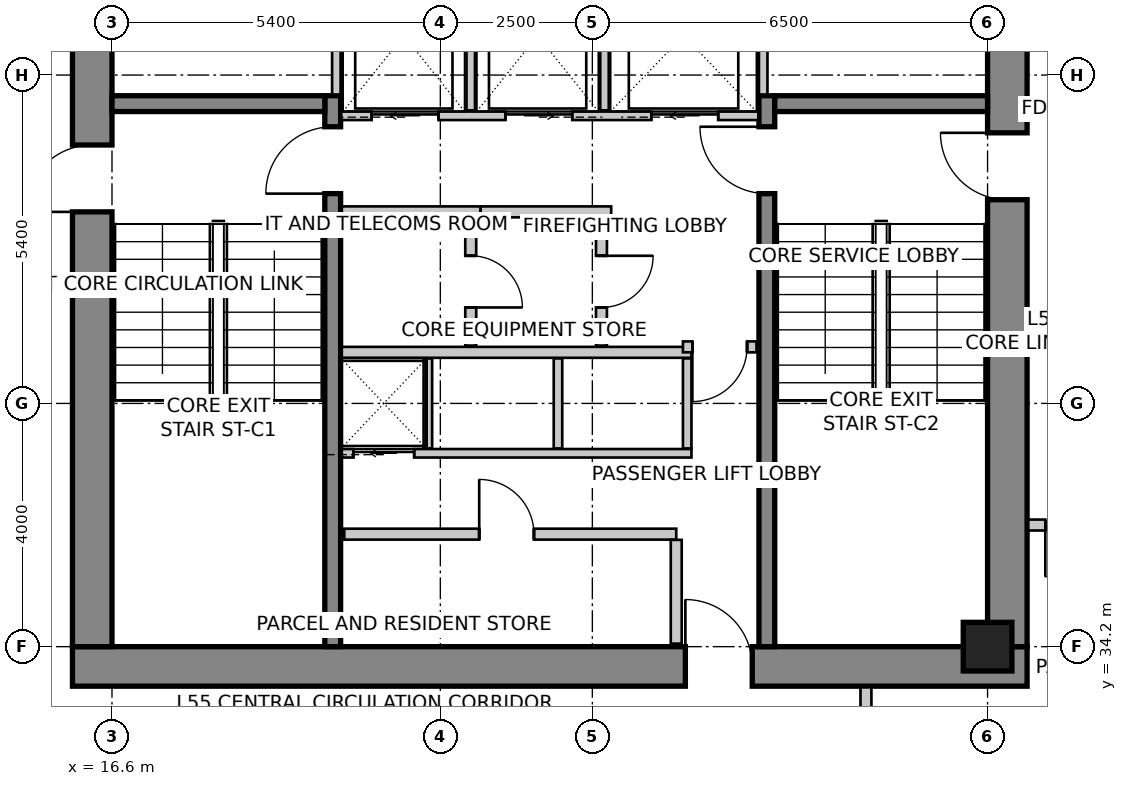
"""IFC4 building model, lengths in metres.
Left out: names, types, materials, properties, quantities, classifications, styles, units other than length and angle.
Written with IfcOpenShell. Run it as: python <this file> out.ifc"""

import sys

from ifc_helpers import new_model, si_unit, direction, frame, frame_2d, origin, origin_2d, place, context, subcontext, project, spatial, rectangle, extrude, source, transform, mapped, element, fill, save


model = new_model("IFC4")
c1 = context("Model", 3, precision=1e-05, world=origin(), true_north=direction((0.0, 1.0)))
c2 = subcontext(c1, "Body", "Model", "MODEL_VIEW")
j1 = project(units=[si_unit("LENGTHUNIT", "METRE"), si_unit("PLANEANGLEUNIT", "RADIAN")], contexts=[c1])
p1 = place(None, origin())
s1 = spatial("IfcSite", under=j1, at=p1, CompositionType="ELEMENT")
p2 = place(p1, origin())
s2 = spatial("IfcBuilding", under=s1, at=p2, CompositionType="ELEMENT")
p3 = place(p2, frame((0.0, 0.0, 218.4)))
s3 = spatial("IfcBuildingStorey", under=s2, at=p3, CompositionType="ELEMENT", Elevation=218.4)
p4 = place(p3, frame((15.95, 33.875, 0.0), z_axis=(0.0, 0.0, 1.0), x_axis=(1.0, 0.0, 0.0)))
e1 = element("IfcWall", 1, at=p4, inside=s3, PredefinedType="SHEAR", context=c2, shape_type="SweptSolid", body=[
    extrude(rectangle(XDim=15.7, YDim=0.65, at=frame_2d((7.85, 0.0))), origin(), (0.0, 0.0, 1.0), 3.5),
])
m1 = source(origin(), c2, "Body", "SweptSolid", [
    extrude(rectangle(XDim=1.1, YDim=2.15, at=frame_2d((0.55, 1.075))), frame((0.0, 0.335, 0.0), z_axis=(0.0, -1.0, 0.0), x_axis=(1.0, 0.0, 0.0)), (0.0, 0.0, 1.0), 0.67),
])
p5 = place(p4, frame((10.08, 0.0, 0.0)))
e2 = element("IfcOpeningElement", 2, at=p5, cuts=e1, PredefinedType="OPENING", context=c2, shape_type="MappedRepresentation", body=[
    mapped(m1, transform((0.0, 0.0, 0.0), scale=1.0)),
])
p6 = place(p3, frame((16.275, 34.2, 0.0), z_axis=(0.0, 0.0, 1.0), x_axis=(0.0, 1.0, 0.0)))
e3 = element("IfcWall", 3, at=p6, inside=s3, PredefinedType="SHEAR", context=c2, shape_type="SweptSolid", body=[
    extrude(rectangle(XDim=11.4, YDim=0.65, at=frame_2d((5.7, 0.0))), origin(), (0.0, 0.0, 1.0), 3.5),
])
p7 = place(p6, frame((7.15, 0.0, 0.0)))
e4 = element("IfcOpeningElement", 4, at=p7, cuts=e3, PredefinedType="OPENING", context=c2, shape_type="MappedRepresentation", body=[
    mapped(m1, transform((0.0, 0.0, 0.0), scale=1.0)),
])
p8 = place(p3, frame((31.325, 34.2, 0.0), z_axis=(0.0, 0.0, 1.0), x_axis=(0.0, 1.0, 0.0)))
e5 = element("IfcWall", 5, at=p8, inside=s3, PredefinedType="SHEAR", context=c2, shape_type="SweptSolid", body=[
    extrude(rectangle(XDim=11.4, YDim=0.65, at=frame_2d((5.7, 0.0))), origin(), (0.0, 0.0, 1.0), 3.5),
])
p9 = place(p8, frame((7.35, 0.0, 0.0)))
e6 = element("IfcOpeningElement", 6, at=p9, cuts=e5, PredefinedType="OPENING", context=c2, shape_type="MappedRepresentation", body=[
    mapped(m1, transform((0.0, 0.0, 0.0), scale=1.0)),
])
p10 = place(p3, frame((20.23, 34.2, 0.0), z_axis=(0.0, 0.0, 1.0), x_axis=(0.0, 1.0, 0.0)))
e7 = element("IfcWall", 7, at=p10, inside=s3, PredefinedType="SHEAR", context=c2, shape_type="SweptSolid", body=[
    extrude(rectangle(XDim=9.06, YDim=0.26, at=frame_2d((4.53, 0.0))), origin(), (0.0, 0.0, 1.0), 3.5),
])
m2 = source(origin(), c2, "Body", "SweptSolid", [
    extrude(rectangle(XDim=1.1, YDim=2.15, at=frame_2d((0.55, 1.075))), frame((0.0, 0.14, 0.0), z_axis=(0.0, -1.0, 0.0), x_axis=(1.0, 0.0, 0.0)), (0.0, 0.0, 1.0), 0.28),
])
p11 = place(p10, frame((7.45, 0.0, 0.0)))
e8 = element("IfcOpeningElement", 8, at=p11, cuts=e7, PredefinedType="OPENING", context=c2, shape_type="MappedRepresentation", body=[
    mapped(m2, transform((0.0, 0.0, 0.0), scale=1.0)),
])
p12 = place(p3, frame((27.37, 34.2, 0.0), z_axis=(0.0, 0.0, 1.0), x_axis=(0.0, 1.0, 0.0)))
e9 = element("IfcWall", 9, at=p12, inside=s3, PredefinedType="SHEAR", context=c2, shape_type="SweptSolid", body=[
    extrude(rectangle(XDim=9.06, YDim=0.26, at=frame_2d((4.53, 0.0))), origin(), (0.0, 0.0, 1.0), 3.5),
])
p13 = place(p12, frame((7.45, 0.0, 0.0)))
e10 = element("IfcOpeningElement", 10, at=p13, cuts=e9, PredefinedType="OPENING", context=c2, shape_type="MappedRepresentation", body=[
    mapped(m2, transform((0.0, 0.0, 0.0), scale=1.0)),
])
for number, where, z_axis, x_axis in (
    (11, (16.6, 43.13, 0.0), (0.0, 0.0, 1.0), (1.0, 0.0, 0.0)),
    (12, (27.5, 43.13, 0.0), (0.0, 0.0, 1.0), (1.0, 0.0, 0.0)),
):
    element("IfcWall", number, at=place(p3, frame(where, z_axis=z_axis, x_axis=x_axis)), inside=s3, PredefinedType="SHEAR", context=c2, shape_type="SweptSolid", body=[
        extrude(rectangle(XDim=3.5, YDim=0.26, at=frame_2d((1.75, 0.0))), origin(), (0.0, 0.0, 1.0), 3.5),
    ])
m3 = source(origin(), c2, "Body", "SweptSolid", [
    extrude(rectangle(XDim=0.8, YDim=0.8, at=origin_2d()), origin(), (0.0, 0.0, 1.0), 3.5),
])
p14 = place(p3, frame((31.0, 34.2, 0.0), z_axis=(0.0, 0.0, 1.0), x_axis=(1.0, 0.0, 0.0)))
e13 = element("IfcColumn", 13, at=p14, inside=s3, PredefinedType="COLUMN", context=c2, shape_type="MappedRepresentation", body=[
    mapped(m3, transform((0.0, 0.0, 0.0), scale=1.0)),
])
p15 = place(p3, frame((20.37, 42.93, 0.0), z_axis=(0.0, 0.0, 1.0), x_axis=(1.0, 0.0, 0.0)))
e14 = element("IfcWall", 14, at=p15, inside=s3, PredefinedType="SOLIDWALL", context=c2, shape_type="SweptSolid", body=[
    extrude(rectangle(XDim=6.86, YDim=0.14, at=frame_2d((3.43, 0.0))), origin(), (0.0, 0.0, 1.0), 3.25),
])
m4 = source(origin(), c2, "Body", "SweptSolid", [
    extrude(rectangle(XDim=1.1, YDim=2.15, at=frame_2d((0.55, 1.075))), frame((0.0, 0.08, 0.0), z_axis=(0.0, -1.0, 0.0), x_axis=(1.0, 0.0, 0.0)), (0.0, 0.0, 1.0), 0.16),
])
p16 = place(p15, frame((0.5, 0.0, 0.0)))
e15 = element("IfcOpeningElement", 15, at=p16, cuts=e14, PredefinedType="OPENING", context=c2, shape_type="MappedRepresentation", body=[
    mapped(m4, transform((0.0, 0.0, 0.0), scale=1.0)),
])
p17 = place(p15, frame((2.7, 0.0, 0.0)))
e16 = element("IfcOpeningElement", 16, at=p17, cuts=e14, PredefinedType="OPENING", context=c2, shape_type="MappedRepresentation", body=[
    mapped(m4, transform((0.0, 0.0, 0.0), scale=1.0)),
])
p18 = place(p15, frame((5.1, 0.0, 0.0)))
e17 = element("IfcOpeningElement", 17, at=p18, cuts=e14, PredefinedType="OPENING", context=c2, shape_type="MappedRepresentation", body=[
    mapped(m4, transform((0.0, 0.0, 0.0), scale=1.0)),
])
for number, where, z_axis, x_axis in (
    (18, (20.29, 43.28, 0.0), (0.0, 0.0, 1.0), (0.0, 1.0, 0.0)),
    (19, (27.31, 43.28, 0.0), (0.0, 0.0, 1.0), (0.0, 1.0, 0.0)),
):
    element("IfcWall", number, at=place(p3, frame(where, z_axis=z_axis, x_axis=x_axis)), inside=s3, PredefinedType="SOLIDWALL", context=c2, shape_type="SweptSolid", body=[
        extrude(rectangle(XDim=2.3, YDim=0.14, at=frame_2d((1.15, 0.0))), origin(), (0.0, 0.0, 1.0), 3.25),
    ])
for number, where, z_axis, x_axis in (
    (20, (22.5, 43.02, 0.0), (0.0, 0.0, 1.0), (0.0, 1.0, 0.0)),
    (21, (24.7, 43.02, 0.0), (0.0, 0.0, 1.0), (0.0, 1.0, 0.0)),
):
    element("IfcWall", number, at=place(p3, frame(where, z_axis=z_axis, x_axis=x_axis)), inside=s3, PredefinedType="SOLIDWALL", context=c2, shape_type="SweptSolid", body=[
        extrude(rectangle(XDim=2.56, YDim=0.14, at=frame_2d((1.28, 0.0))), origin(), (0.0, 0.0, 1.0), 3.25),
    ])
p19 = place(p3, frame((20.38, 37.38, 0.0), z_axis=(0.0, 0.0, 1.0), x_axis=(1.0, 0.0, 0.0)))
e22 = element("IfcWall", 22, at=p19, inside=s3, PredefinedType="SOLIDWALL", context=c2, shape_type="SweptSolid", body=[
    extrude(rectangle(XDim=5.75, YDim=0.14, at=frame_2d((2.875, 0.0))), origin(), (0.0, 0.0, 1.0), 3.25),
])
m5 = source(origin(), c2, "Body", "SweptSolid", [
    extrude(rectangle(XDim=1.0, YDim=2.15, at=frame_2d((0.5, 1.075))), frame((0.0, 0.08, 0.0), z_axis=(0.0, -1.0, 0.0), x_axis=(1.0, 0.0, 0.0)), (0.0, 0.0, 1.0), 0.16),
])
p20 = place(p19, frame((0.19, 0.0, 0.0)))
e23 = element("IfcOpeningElement", 23, at=p20, cuts=e22, PredefinedType="OPENING", context=c2, shape_type="MappedRepresentation", body=[
    mapped(m5, transform((0.0, 0.0, 0.0), scale=1.0)),
])
p21 = place(p3, frame((20.38, 39.04, 0.0), z_axis=(0.0, 0.0, 1.0), x_axis=(1.0, 0.0, 0.0)))
e24 = element("IfcWall", 24, at=p21, inside=s3, PredefinedType="SOLIDWALL", context=c2, shape_type="SweptSolid", body=[
    extrude(rectangle(XDim=5.75, YDim=0.18, at=frame_2d((2.875, 0.0))), origin(), (0.0, 0.0, 1.0), 3.25),
])
for number, where, z_axis, x_axis in (
    (25, (26.06, 37.46, 0.0), (0.0, 0.0, 1.0), (0.0, 1.0, 0.0)),
    (26, (21.795, 37.46, 0.0), (0.0, 0.0, 1.0), (0.0, 1.0, 0.0)),
    (27, (23.935, 37.46, 0.0), (0.0, 0.0, 1.0), (0.0, 1.0, 0.0)),
):
    element("IfcWall", number, at=place(p3, frame(where, z_axis=z_axis, x_axis=x_axis)), inside=s3, PredefinedType="SOLIDWALL", context=c2, shape_type="SweptSolid", body=[
        extrude(rectangle(XDim=1.48, YDim=0.14, at=frame_2d((0.74, 0.0))), origin(), (0.0, 0.0, 1.0), 3.25),
    ])
p22 = place(p3, frame((22.66, 41.35, 0.0), z_axis=(0.0, 0.0, 1.0), x_axis=(-1.0, 0.0, 0.0)))
e28 = element("IfcWall", 28, at=p22, inside=s3, PredefinedType="PARTITIONING", context=c2, shape_type="SweptSolid", body=[
    extrude(rectangle(XDim=2.28, YDim=0.18, at=frame_2d((1.14, 0.0))), origin(), (0.0, 0.0, 1.0), 3.25),
])
p23 = place(p3, frame((24.81, 41.35, 0.0), z_axis=(0.0, 0.0, 1.0), x_axis=(-1.0, 0.0, 0.0)))
e29 = element("IfcWall", 29, at=p23, inside=s3, PredefinedType="PARTITIONING", context=c2, shape_type="SweptSolid", body=[
    extrude(rectangle(XDim=2.148, YDim=0.18, at=frame_2d((1.074, 0.0))), origin(), (0.0, 0.0, 1.0), 3.25),
])
p24 = place(p3, frame((22.5, 41.256, 0.0), z_axis=(0.0, 0.0, 1.0), x_axis=(0.0, -1.0, 0.0)))
e30 = element("IfcWall", 30, at=p24, inside=s3, PredefinedType="PARTITIONING", context=c2, shape_type="SweptSolid", body=[
    extrude(rectangle(XDim=2.106, YDim=0.18, at=frame_2d((1.053, 0.0))), origin(), (0.0, 0.0, 1.0), 3.25),
])
m6 = source(origin(), c2, "Body", "SweptSolid", [
    extrude(rectangle(XDim=0.85, YDim=2.15, at=frame_2d((0.425, 1.075))), frame((0.0, 0.1, 0.0), z_axis=(0.0, -1.0, 0.0), x_axis=(1.0, 0.0, 0.0)), (0.0, 0.0, 1.0), 0.2),
])
p25 = place(p24, frame((0.628, 0.0, 0.0)))
e31 = element("IfcOpeningElement", 31, at=p25, cuts=e30, PredefinedType="OPENING", context=c2, shape_type="MappedRepresentation", body=[
    mapped(m6, transform((0.0, 0.0, 0.0), scale=1.0)),
])
p26 = place(p3, frame((24.65, 41.256, 0.0), z_axis=(0.0, 0.0, 1.0), x_axis=(0.0, -1.0, 0.0)))
e32 = element("IfcWall", 32, at=p26, inside=s3, PredefinedType="PARTITIONING", context=c2, shape_type="SweptSolid", body=[
    extrude(rectangle(XDim=2.106, YDim=0.18, at=frame_2d((1.053, 0.0))), origin(), (0.0, 0.0, 1.0), 3.25),
])
p27 = place(p26, frame((0.628, 0.0, 0.0)))
e33 = element("IfcOpeningElement", 33, at=p27, cuts=e32, PredefinedType="OPENING", context=c2, shape_type="MappedRepresentation", body=[
    mapped(m6, transform((0.0, 0.0, 0.0), scale=1.0)),
])
p28 = place(p3, frame((27.2, 39.13, 0.0), z_axis=(0.0, 0.0, 1.0), x_axis=(-1.0, 0.0, 0.0)))
e34 = element("IfcWall", 34, at=p28, inside=s3, PredefinedType="PARTITIONING", context=c2, shape_type="SweptSolid", body=[
    extrude(rectangle(XDim=1.21, YDim=0.18, at=frame_2d((0.605, 0.0))), origin(), (0.0, 0.0, 1.0), 3.25),
])
m7 = source(origin(), c2, "Body", "SweptSolid", [
    extrude(rectangle(XDim=0.9, YDim=2.15, at=frame_2d((0.45, 1.075))), frame((0.0, 0.1, 0.0), z_axis=(0.0, -1.0, 0.0), x_axis=(1.0, 0.0, 0.0)), (0.0, 0.0, 1.0), 0.2),
])
p29 = place(p28, frame((0.155, 0.0, 0.0)))
e35 = element("IfcOpeningElement", 35, at=p29, cuts=e34, PredefinedType="OPENING", context=c2, shape_type="MappedRepresentation", body=[
    mapped(m7, transform((0.0, 0.0, 0.0), scale=1.0)),
])
p30 = place(p3, frame((20.42, 36.05, 0.0), z_axis=(0.0, 0.0, 1.0), x_axis=(1.0, 0.0, 0.0)))
e36 = element("IfcWall", 36, at=p30, inside=s3, PredefinedType="PARTITIONING", context=c2, shape_type="SweptSolid", body=[
    extrude(rectangle(XDim=5.46, YDim=0.18, at=frame_2d((2.73, 0.0))), origin(), (0.0, 0.0, 1.0), 3.25),
])
p31 = place(p30, frame((2.219, 0.0, 0.0)))
e37 = element("IfcOpeningElement", 37, at=p31, cuts=e36, PredefinedType="OPENING", context=c2, shape_type="MappedRepresentation", body=[
    mapped(m7, transform((0.0, 0.0, 0.0), scale=1.0)),
])
p32 = place(p3, frame((25.88, 35.956, 0.0), z_axis=(0.0, 0.0, 1.0), x_axis=(0.0, -1.0, 0.0)))
e38 = element("IfcWall", 38, at=p32, inside=s3, PredefinedType="PARTITIONING", context=c2, shape_type="SweptSolid", body=[
    extrude(rectangle(XDim=1.706, YDim=0.18, at=frame_2d((0.853, 0.0))), origin(), (0.0, 0.0, 1.0), 2.542),
])
p33 = place(p3, frame((29.0, 33.53, 0.0), z_axis=(0.0, 0.0, 1.0), x_axis=(0.0, -1.0, 0.0)))
e39 = element("IfcWall", 39, at=p33, inside=s3, PredefinedType="PARTITIONING", context=c2, shape_type="SweptSolid", body=[
    extrude(rectangle(XDim=1.127, YDim=0.18, at=frame_2d((0.563, 0.0))), origin(), (0.0, 0.0, 1.0), 3.25),
])
p34 = place(p3, frame((33.15, 36.2, 0.0), z_axis=(0.0, 0.0, 1.0), x_axis=(-1.0, 0.0, 0.0)))
e40 = element("IfcWall", 40, at=p34, inside=s3, PredefinedType="PARTITIONING", context=c2, shape_type="SweptSolid", body=[
    extrude(rectangle(XDim=1.48, YDim=0.18, at=frame_2d((0.74, 0.0))), origin(), (0.0, 0.0, 1.0), 3.25),
])
p35 = place(p34, frame((0.35, 0.0, 0.0)))
e41 = element("IfcOpeningElement", 41, at=p35, cuts=e40, PredefinedType="OPENING", context=c2, shape_type="MappedRepresentation", body=[
    mapped(m6, transform((0.0, 0.0, 0.0), scale=1.0)),
])
m8 = source(origin(), c2, "Body", "SweptSolid", [
    extrude(rectangle(XDim=1.1, YDim=2.15, at=frame_2d((0.55, 1.075))), frame((0.0, 0.025, 0.0), z_axis=(0.0, -1.0, 0.0), x_axis=(1.0, 0.0, 0.0)), (0.0, 0.0, 1.0), 0.05),
])
p36 = place(p16, origin())
e42 = element("IfcDoor", 42, at=p36, inside=s3, OperationType="SLIDING_TO_LEFT", PredefinedType="DOOR", context=c2, shape_type="MappedRepresentation", body=[
    mapped(m8, transform((0.0, 0.0, 0.0), scale=1.0)),
])
fill(e15, e42)
p37 = place(p17, origin())
e43 = element("IfcDoor", 43, at=p37, inside=s3, OperationType="SLIDING_TO_RIGHT", PredefinedType="DOOR", context=c2, shape_type="MappedRepresentation", body=[
    mapped(m8, transform((0.0, 0.0, 0.0), scale=1.0)),
])
fill(e16, e43)
m9 = source(origin(), c2, "Body", "SweptSolid", [
    extrude(rectangle(XDim=1.1, YDim=2.15, at=frame_2d((0.55, 1.075))), frame((0.0, 0.025, 0.0), z_axis=(0.0, -1.0, 0.0), x_axis=(1.0, 0.0, 0.0)), (0.0, 0.0, 1.0), 0.05),
])
p38 = place(p18, origin())
e44 = element("IfcDoor", 44, at=p38, inside=s3, OperationType="SLIDING_TO_LEFT", PredefinedType="DOOR", context=c2, shape_type="MappedRepresentation", body=[
    mapped(m9, transform((0.0, 0.0, 0.0), scale=1.0)),
])
fill(e17, e44)
m10 = source(origin(), c2, "Body", "SweptSolid", [
    extrude(rectangle(XDim=1.0, YDim=2.15, at=frame_2d((0.5, 1.075))), frame((0.0, 0.025, 0.0), z_axis=(0.0, -1.0, 0.0), x_axis=(1.0, 0.0, 0.0)), (0.0, 0.0, 1.0), 0.05),
])
p39 = place(p20, origin())
e45 = element("IfcDoor", 45, at=p39, inside=s3, OperationType="SLIDING_TO_LEFT", PredefinedType="DOOR", context=c2, shape_type="MappedRepresentation", body=[
    mapped(m10, transform((0.0, 0.0, 0.0), scale=1.0)),
])
fill(e23, e45)
m11 = source(origin(), c2, "Body", "SweptSolid", [
    extrude(rectangle(XDim=1.1, YDim=2.15, at=frame_2d((0.55, 1.075))), frame((0.0, 0.025, 0.0), z_axis=(0.0, -1.0, 0.0), x_axis=(1.0, 0.0, 0.0)), (0.0, 0.0, 1.0), 0.05),
])
p40 = place(p11, origin())
e46 = element("IfcDoor", 46, at=p40, inside=s3, OperationType="SINGLE_SWING_LEFT", PredefinedType="DOOR", context=c2, shape_type="MappedRepresentation", body=[
    mapped(m11, transform((0.0, 0.0, 0.0), scale=1.0)),
])
fill(e8, e46)
p41 = place(p13, origin())
e47 = element("IfcDoor", 47, at=p41, inside=s3, OperationType="SINGLE_SWING_RIGHT", PredefinedType="DOOR", context=c2, shape_type="MappedRepresentation", body=[
    mapped(m11, transform((0.0, 0.0, 0.0), scale=1.0)),
])
fill(e10, e47)
p42 = place(p7, origin())
e48 = element("IfcDoor", 48, at=p42, inside=s3, OperationType="SINGLE_SWING_LEFT", PredefinedType="DOOR", context=c2, shape_type="MappedRepresentation", body=[
    mapped(m11, transform((0.0, 0.0, 0.0), scale=1.0)),
])
fill(e4, e48)
p43 = place(p9, origin())
e49 = element("IfcDoor", 49, at=p43, inside=s3, OperationType="SINGLE_SWING_RIGHT", PredefinedType="DOOR", context=c2, shape_type="MappedRepresentation", body=[
    mapped(m11, transform((0.0, 0.0, 0.0), scale=1.0)),
])
fill(e6, e49)
p44 = place(p5, origin())
e50 = element("IfcDoor", 50, at=p44, inside=s3, OperationType="SINGLE_SWING_LEFT", PredefinedType="DOOR", context=c2, shape_type="MappedRepresentation", body=[
    mapped(m11, transform((0.0, 0.0, 0.0), scale=1.0)),
])
fill(e2, e50)
m12 = source(origin(), c2, "Body", "SweptSolid", [
    extrude(rectangle(XDim=0.85, YDim=2.15, at=frame_2d((0.425, 1.075))), frame((0.0, 0.025, 0.0), z_axis=(0.0, -1.0, 0.0), x_axis=(1.0, 0.0, 0.0)), (0.0, 0.0, 1.0), 0.05),
])
p45 = place(p25, origin())
e51 = element("IfcDoor", 51, at=p45, inside=s3, OperationType="SINGLE_SWING_RIGHT", PredefinedType="DOOR", context=c2, shape_type="MappedRepresentation", body=[
    mapped(m12, transform((0.0, 0.0, 0.0), scale=1.0)),
])
fill(e31, e51)
p46 = place(p27, origin())
e52 = element("IfcDoor", 52, at=p46, inside=s3, OperationType="SINGLE_SWING_LEFT", PredefinedType="DOOR", context=c2, shape_type="MappedRepresentation", body=[
    mapped(m12, transform((0.0, 0.0, 0.0), scale=1.0)),
])
fill(e33, e52)
m13 = source(origin(), c2, "Body", "SweptSolid", [
    extrude(rectangle(XDim=0.9, YDim=2.15, at=frame_2d((0.45, 1.075))), frame((0.0, 0.025, 0.0), z_axis=(0.0, -1.0, 0.0), x_axis=(1.0, 0.0, 0.0)), (0.0, 0.0, 1.0), 0.05),
])
p47 = place(p29, origin())
e53 = element("IfcDoor", 53, at=p47, inside=s3, OperationType="SINGLE_SWING_RIGHT", PredefinedType="DOOR", context=c2, shape_type="MappedRepresentation", body=[
    mapped(m13, transform((0.0, 0.0, 0.0), scale=1.0)),
])
fill(e35, e53)
p48 = place(p31, origin())
e54 = element("IfcDoor", 54, at=p48, inside=s3, OperationType="SINGLE_SWING_LEFT", PredefinedType="DOOR", context=c2, shape_type="MappedRepresentation", body=[
    mapped(m13, transform((0.0, 0.0, 0.0), scale=1.0)),
])
fill(e37, e54)
m14 = source(origin(), c2, "Body", "SweptSolid", [
    extrude(rectangle(XDim=0.85, YDim=2.15, at=frame_2d((0.425, 1.075))), frame((0.0, 0.025, 0.0), z_axis=(0.0, -1.0, 0.0), x_axis=(1.0, 0.0, 0.0)), (0.0, 0.0, 1.0), 0.05),
])
p49 = place(p35, origin())
e55 = element("IfcDoor", 55, at=p49, inside=s3, OperationType="SINGLE_SWING_RIGHT", PredefinedType="DOOR", context=c2, shape_type="MappedRepresentation", body=[
    mapped(m14, transform((0.0, 0.0, 0.0), scale=1.0)),
])
fill(e41, e55)
save(model, sys.argv[1])
